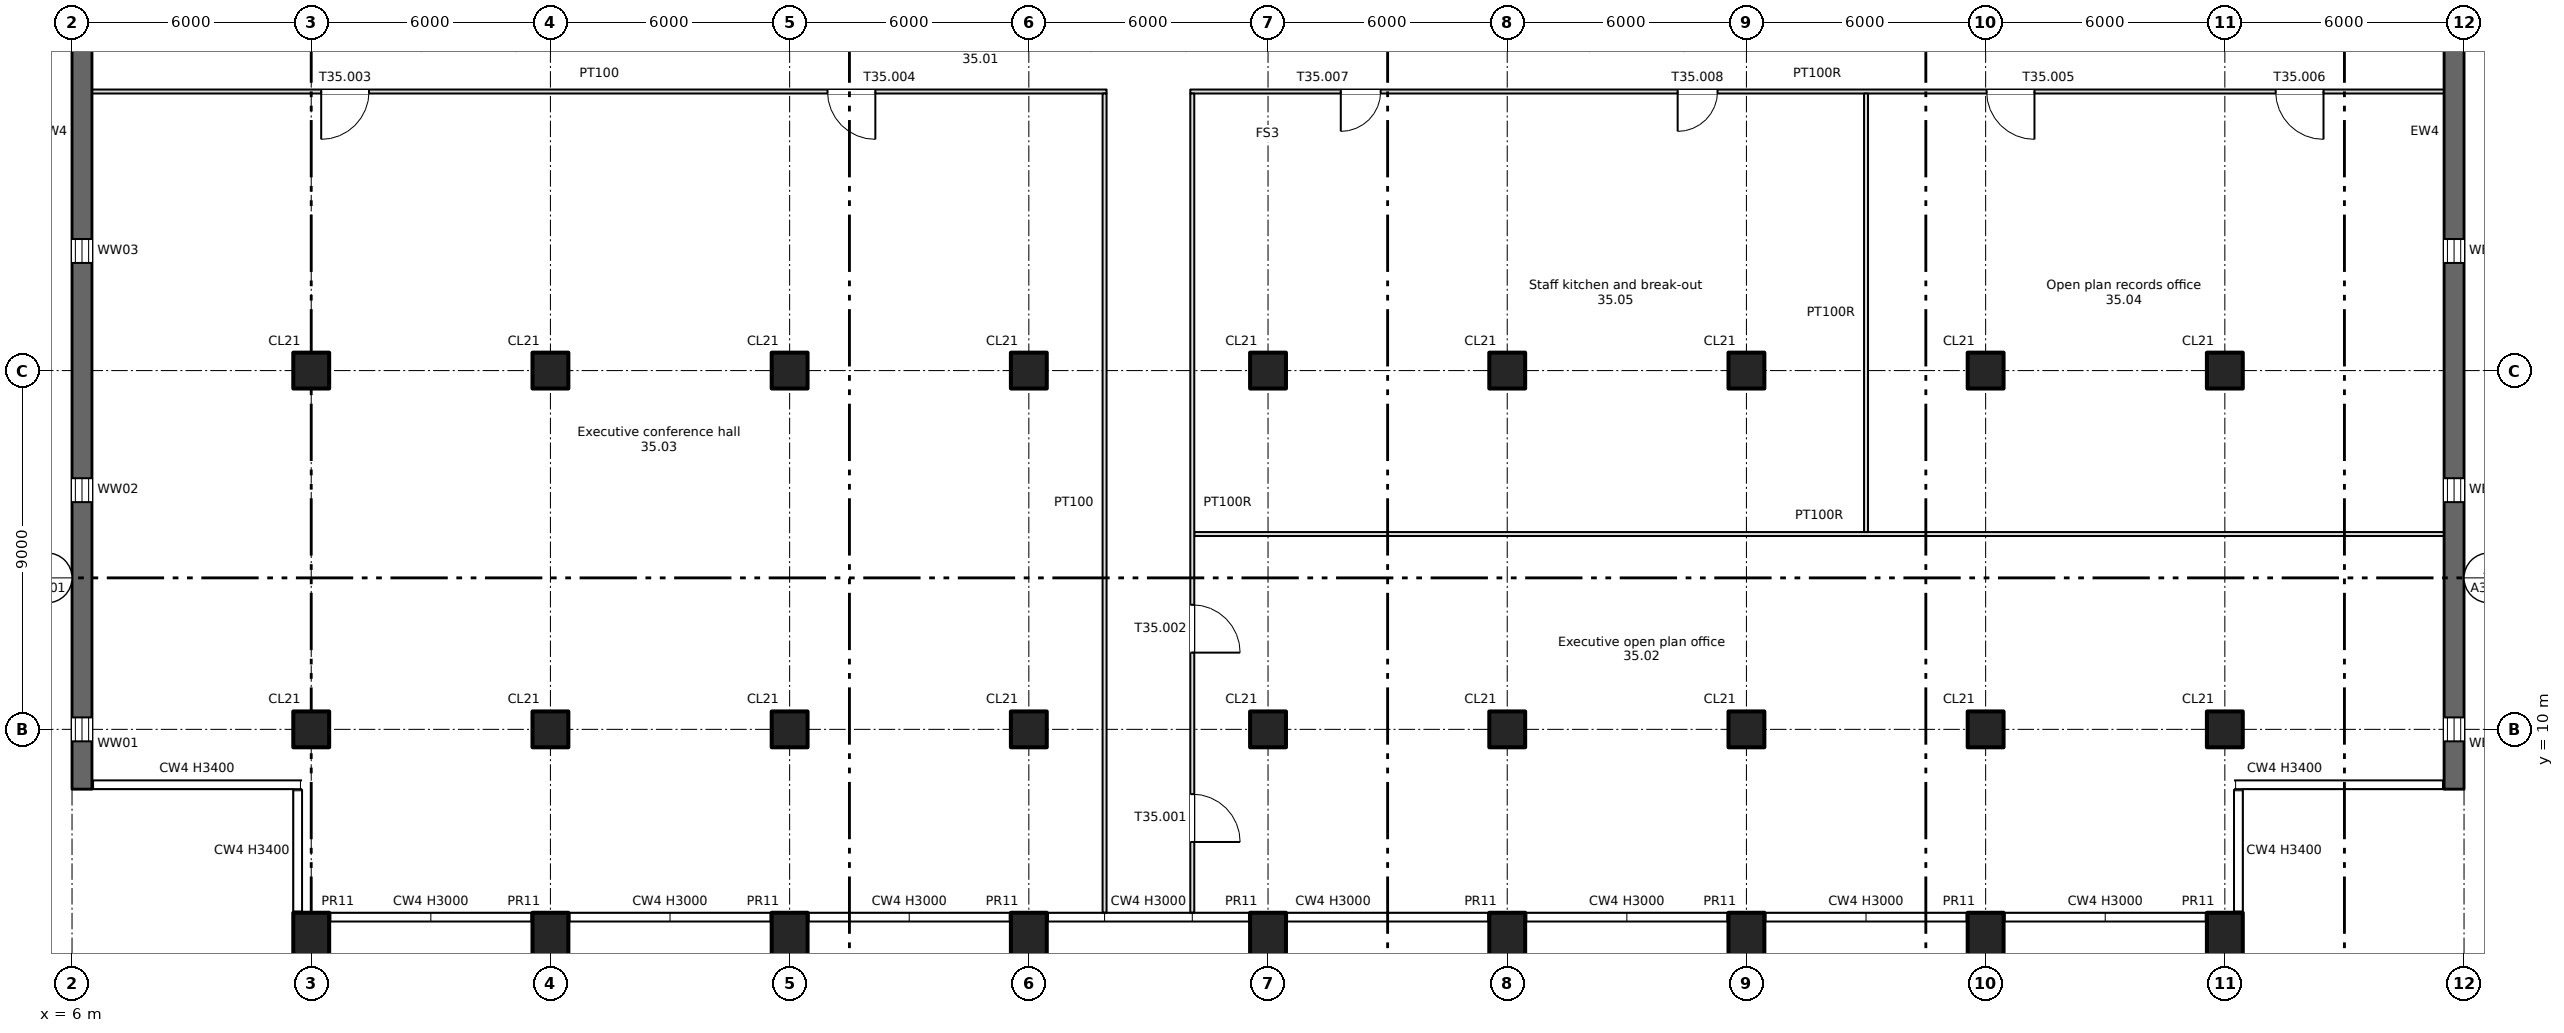
"""IFC4 building model, lengths in metres.
Left out: names, types, materials, properties, quantities, classifications, styles, units other than length and angle.
Written with IfcOpenShell. Run it as: python <this file> out.ifc"""

import sys

from ifc_helpers import new_model, si_unit, direction, frame, frame_2d, origin, origin_2d, place, context, subcontext, project, spatial, rectangle, extrude, element, fill, save


model = new_model("IFC4")
c1 = context("Model", 3, precision=1e-05, world=origin(), true_north=direction((0.0, 1.0)))
c2 = subcontext(c1, "Body", "Model", "MODEL_VIEW")
j1 = project(units=[si_unit("LENGTHUNIT", "METRE"), si_unit("PLANEANGLEUNIT", "RADIAN")], contexts=[c1])
p1 = place(None, origin())
s1 = spatial("IfcSite", under=j1, at=p1, CompositionType="ELEMENT")
p2 = place(p1, origin())
s2 = spatial("IfcBuilding", under=s1, at=p2, CompositionType="ELEMENT")
p3 = place(p2, frame((0.0, 0.0, 243.15)))
s3 = spatial("IfcBuildingStorey", under=s2, at=p3, CompositionType="ELEMENT", Elevation=243.15)
for number, where, z_axis, x_axis in (
    (1, (12.0, 4.7, -0.4), (0.0, 0.0, 1.0), (1.0, 0.0, 0.0)),
    (2, (18.0, 4.7, -0.4), (0.0, 0.0, 1.0), (1.0, 0.0, 0.0)),
    (3, (24.0, 4.7, -0.4), (0.0, 0.0, 1.0), (1.0, 0.0, 0.0)),
    (4, (30.0, 4.7, -0.4), (0.0, 0.0, 1.0), (1.0, 0.0, 0.0)),
    (5, (36.0, 4.7, -0.4), (0.0, 0.0, 1.0), (1.0, 0.0, 0.0)),
    (6, (42.0, 4.7, -0.4), (0.0, 0.0, 1.0), (1.0, 0.0, 0.0)),
    (7, (48.0, 4.7, -0.4), (0.0, 0.0, 1.0), (1.0, 0.0, 0.0)),
    (8, (54.0, 4.7, -0.4), (0.0, 0.0, 1.0), (1.0, 0.0, 0.0)),
    (9, (60.0, 4.7, -0.4), (0.0, 0.0, 1.0), (1.0, 0.0, 0.0)),
):
    element("IfcColumn", number, at=place(p3, frame(where, z_axis=z_axis, x_axis=x_axis)), inside=s3, PredefinedType="COLUMN", context=c2, shape_type="SweptSolid", body=[
        extrude(rectangle(XDim=0.9, YDim=1.4, at=origin_2d()), origin(), (0.0, 0.0, 1.0), 3.8),
    ])
for number, where, z_axis, x_axis in (
    (10, (12.0, 10.0, 0.0), (0.0, 0.0, 1.0), (1.0, 0.0, 0.0)),
    (11, (12.0, 19.0, 0.0), (0.0, 0.0, 1.0), (1.0, 0.0, 0.0)),
    (12, (18.0, 10.0, 0.0), (0.0, 0.0, 1.0), (1.0, 0.0, 0.0)),
    (13, (18.0, 19.0, 0.0), (0.0, 0.0, 1.0), (1.0, 0.0, 0.0)),
    (14, (24.0, 10.0, 0.0), (0.0, 0.0, 1.0), (1.0, 0.0, 0.0)),
    (15, (24.0, 19.0, 0.0), (0.0, 0.0, 1.0), (1.0, 0.0, 0.0)),
    (16, (30.0, 10.0, 0.0), (0.0, 0.0, 1.0), (1.0, 0.0, 0.0)),
    (17, (30.0, 19.0, 0.0), (0.0, 0.0, 1.0), (1.0, 0.0, 0.0)),
    (18, (36.0, 10.0, 0.0), (0.0, 0.0, 1.0), (1.0, 0.0, 0.0)),
    (19, (36.0, 19.0, 0.0), (0.0, 0.0, 1.0), (1.0, 0.0, 0.0)),
    (20, (42.0, 10.0, 0.0), (0.0, 0.0, 1.0), (1.0, 0.0, 0.0)),
    (21, (42.0, 19.0, 0.0), (0.0, 0.0, 1.0), (1.0, 0.0, 0.0)),
    (22, (48.0, 10.0, 0.0), (0.0, 0.0, 1.0), (1.0, 0.0, 0.0)),
    (23, (48.0, 19.0, 0.0), (0.0, 0.0, 1.0), (1.0, 0.0, 0.0)),
    (24, (54.0, 10.0, 0.0), (0.0, 0.0, 1.0), (1.0, 0.0, 0.0)),
    (25, (54.0, 19.0, 0.0), (0.0, 0.0, 1.0), (1.0, 0.0, 0.0)),
    (26, (60.0, 10.0, 0.0), (0.0, 0.0, 1.0), (1.0, 0.0, 0.0)),
    (27, (60.0, 19.0, 0.0), (0.0, 0.0, 1.0), (1.0, 0.0, 0.0)),
):
    element("IfcColumn", number, at=place(p3, frame(where, z_axis=z_axis, x_axis=x_axis)), inside=s3, PredefinedType="COLUMN", context=c2, shape_type="SweptSolid", body=[
        extrude(rectangle(XDim=0.9, YDim=0.9, at=origin_2d()), origin(), (0.0, 0.0, 1.0), 3.4),
    ])
p4 = place(p3, frame((6.25, 8.5, 0.0), z_axis=(0.0, 0.0, 1.0), x_axis=(0.0, 1.0, 0.0)))
e28 = element("IfcWall", 28, at=p4, inside=s3, PredefinedType="SHEAR", context=c2, shape_type="SweptSolid", body=[
    extrude(rectangle(XDim=33.0, YDim=0.5, at=frame_2d((16.5, 0.0))), origin(), (0.0, 0.0, 1.0), 3.4),
])
p5 = place(p4, frame((1.2, 0.0, 0.6)))
e29 = element("IfcOpeningElement", 29, at=p5, cuts=e28, PredefinedType="OPENING", context=c2, shape_type="SweptSolid", body=[
    extrude(rectangle(XDim=0.6, YDim=2.4, at=frame_2d((0.3, 1.2))), frame((0.0, 0.26, 0.0), z_axis=(0.0, -1.0, 0.0), x_axis=(1.0, 0.0, 0.0)), (0.0, 0.0, 1.0), 0.52),
])
p6 = place(p4, frame((7.2, 0.0, 0.6)))
e30 = element("IfcOpeningElement", 30, at=p6, cuts=e28, PredefinedType="OPENING", context=c2, shape_type="SweptSolid", body=[
    extrude(rectangle(XDim=0.6, YDim=2.4, at=frame_2d((0.3, 1.2))), frame((0.0, 0.26, 0.0), z_axis=(0.0, -1.0, 0.0), x_axis=(1.0, 0.0, 0.0)), (0.0, 0.0, 1.0), 0.52),
])
p7 = place(p4, frame((13.2, 0.0, 0.6)))
e31 = element("IfcOpeningElement", 31, at=p7, cuts=e28, PredefinedType="OPENING", context=c2, shape_type="SweptSolid", body=[
    extrude(rectangle(XDim=0.6, YDim=2.4, at=frame_2d((0.3, 1.2))), frame((0.0, 0.26, 0.0), z_axis=(0.0, -1.0, 0.0), x_axis=(1.0, 0.0, 0.0)), (0.0, 0.0, 1.0), 0.52),
])
p8 = place(p3, frame((65.75, 8.5, 0.0), z_axis=(0.0, 0.0, 1.0), x_axis=(0.0, 1.0, 0.0)))
e32 = element("IfcWall", 32, at=p8, inside=s3, PredefinedType="SHEAR", context=c2, shape_type="SweptSolid", body=[
    extrude(rectangle(XDim=33.0, YDim=0.5, at=frame_2d((16.5, 0.0))), origin(), (0.0, 0.0, 1.0), 3.4),
])
p9 = place(p8, frame((1.2, 0.0, 0.6)))
e33 = element("IfcOpeningElement", 33, at=p9, cuts=e32, PredefinedType="OPENING", context=c2, shape_type="SweptSolid", body=[
    extrude(rectangle(XDim=0.6, YDim=2.4, at=frame_2d((0.3, 1.2))), frame((0.0, 0.26, 0.0), z_axis=(0.0, -1.0, 0.0), x_axis=(1.0, 0.0, 0.0)), (0.0, 0.0, 1.0), 0.52),
])
p10 = place(p8, frame((7.2, 0.0, 0.6)))
e34 = element("IfcOpeningElement", 34, at=p10, cuts=e32, PredefinedType="OPENING", context=c2, shape_type="SweptSolid", body=[
    extrude(rectangle(XDim=0.6, YDim=2.4, at=frame_2d((0.3, 1.2))), frame((0.0, 0.26, 0.0), z_axis=(0.0, -1.0, 0.0), x_axis=(1.0, 0.0, 0.0)), (0.0, 0.0, 1.0), 0.52),
])
p11 = place(p8, frame((13.2, 0.0, 0.6)))
e35 = element("IfcOpeningElement", 35, at=p11, cuts=e32, PredefinedType="OPENING", context=c2, shape_type="SweptSolid", body=[
    extrude(rectangle(XDim=0.6, YDim=2.4, at=frame_2d((0.3, 1.2))), frame((0.0, 0.26, 0.0), z_axis=(0.0, -1.0, 0.0), x_axis=(1.0, 0.0, 0.0)), (0.0, 0.0, 1.0), 0.52),
])
p12 = place(p3, frame((34.15, 14.9, 0.0), z_axis=(0.0, 0.0, 1.0), x_axis=(1.0, 0.0, 0.0)))
e36 = element("IfcWall", 36, at=p12, inside=s3, PredefinedType="PARTITIONING", context=c2, shape_type="SweptSolid", body=[
    extrude(rectangle(XDim=31.35, YDim=0.1, at=frame_2d((15.675, 0.0))), origin(), (0.0, 0.0, 1.0), 3.4),
])
p13 = place(p3, frame((6.5, 26.0, 0.0), z_axis=(0.0, 0.0, 1.0), x_axis=(1.0, 0.0, 0.0)))
e37 = element("IfcWall", 37, at=p13, inside=s3, PredefinedType="PARTITIONING", context=c2, shape_type="SweptSolid", body=[
    extrude(rectangle(XDim=25.45, YDim=0.1, at=frame_2d((12.725, 0.0))), origin(), (0.0, 0.0, 1.0), 3.4),
])
p14 = place(p13, frame((5.75, 0.0, 0.0)))
e38 = element("IfcOpeningElement", 38, at=p14, cuts=e37, PredefinedType="OPENING", context=c2, shape_type="SweptSolid", body=[
    extrude(rectangle(XDim=1.2, YDim=2.1, at=frame_2d((0.6, 1.05))), frame((0.0, 0.06, 0.0), z_axis=(0.0, -1.0, 0.0), x_axis=(1.0, 0.0, 0.0)), (0.0, 0.0, 1.0), 0.12),
])
p15 = place(p13, frame((18.45, 0.0, 0.0)))
e39 = element("IfcOpeningElement", 39, at=p15, cuts=e37, PredefinedType="OPENING", context=c2, shape_type="SweptSolid", body=[
    extrude(rectangle(XDim=1.2, YDim=2.1, at=frame_2d((0.6, 1.05))), frame((0.0, 0.06, 0.0), z_axis=(0.0, -1.0, 0.0), x_axis=(1.0, 0.0, 0.0)), (0.0, 0.0, 1.0), 0.12),
])
p16 = place(p3, frame((34.05, 26.0, 0.0), z_axis=(0.0, 0.0, 1.0), x_axis=(1.0, 0.0, 0.0)))
e40 = element("IfcWall", 40, at=p16, inside=s3, PredefinedType="PARTITIONING", context=c2, shape_type="SweptSolid", body=[
    extrude(rectangle(XDim=31.45, YDim=0.1, at=frame_2d((15.725, 0.0))), origin(), (0.0, 0.0, 1.0), 3.4),
])
p17 = place(p16, frame((19.975, 0.0, 0.0)))
e41 = element("IfcOpeningElement", 41, at=p17, cuts=e40, PredefinedType="OPENING", context=c2, shape_type="SweptSolid", body=[
    extrude(rectangle(XDim=1.2, YDim=2.1, at=frame_2d((0.6, 1.05))), frame((0.0, 0.06, 0.0), z_axis=(0.0, -1.0, 0.0), x_axis=(1.0, 0.0, 0.0)), (0.0, 0.0, 1.0), 0.12),
])
p18 = place(p16, frame((27.225, 0.0, 0.0)))
e42 = element("IfcOpeningElement", 42, at=p18, cuts=e40, PredefinedType="OPENING", context=c2, shape_type="SweptSolid", body=[
    extrude(rectangle(XDim=1.2, YDim=2.1, at=frame_2d((0.6, 1.05))), frame((0.0, 0.06, 0.0), z_axis=(0.0, -1.0, 0.0), x_axis=(1.0, 0.0, 0.0)), (0.0, 0.0, 1.0), 0.12),
])
p19 = place(p16, frame((3.775, 0.0, 0.0)))
e43 = element("IfcOpeningElement", 43, at=p19, cuts=e40, PredefinedType="OPENING", context=c2, shape_type="SweptSolid", body=[
    extrude(rectangle(XDim=1.0, YDim=2.1, at=frame_2d((0.5, 1.05))), frame((0.0, 0.06, 0.0), z_axis=(0.0, -1.0, 0.0), x_axis=(1.0, 0.0, 0.0)), (0.0, 0.0, 1.0), 0.12),
])
p20 = place(p16, frame((12.225, 0.0, 0.0)))
e44 = element("IfcOpeningElement", 44, at=p20, cuts=e40, PredefinedType="OPENING", context=c2, shape_type="SweptSolid", body=[
    extrude(rectangle(XDim=1.0, YDim=2.1, at=frame_2d((0.5, 1.05))), frame((0.0, 0.06, 0.0), z_axis=(0.0, -1.0, 0.0), x_axis=(1.0, 0.0, 0.0)), (0.0, 0.0, 1.0), 0.12),
])
p21 = place(p3, frame((31.9, 5.4, 0.0), z_axis=(0.0, 0.0, 1.0), x_axis=(0.0, 1.0, 0.0)))
e45 = element("IfcWall", 45, at=p21, inside=s3, PredefinedType="PARTITIONING", context=c2, shape_type="SweptSolid", body=[
    extrude(rectangle(XDim=20.55, YDim=0.1, at=frame_2d((10.275, 0.0))), origin(), (0.0, 0.0, 1.0), 3.4),
])
p22 = place(p3, frame((34.1, 5.4, 0.0), z_axis=(0.0, 0.0, 1.0), x_axis=(0.0, 1.0, 0.0)))
e46 = element("IfcWall", 46, at=p22, inside=s3, PredefinedType="PARTITIONING", context=c2, shape_type="SweptSolid", body=[
    extrude(rectangle(XDim=20.55, YDim=0.1, at=frame_2d((10.275, 0.0))), origin(), (0.0, 0.0, 1.0), 3.4),
])
p23 = place(p22, frame((1.775, 0.0, 0.0)))
e47 = element("IfcOpeningElement", 47, at=p23, cuts=e46, PredefinedType="OPENING", context=c2, shape_type="SweptSolid", body=[
    extrude(rectangle(XDim=1.2, YDim=2.1, at=frame_2d((0.6, 1.05))), frame((0.0, 0.06, 0.0), z_axis=(0.0, -1.0, 0.0), x_axis=(1.0, 0.0, 0.0)), (0.0, 0.0, 1.0), 0.12),
])
p24 = place(p22, frame((6.525, 0.0, 0.0)))
e48 = element("IfcOpeningElement", 48, at=p24, cuts=e46, PredefinedType="OPENING", context=c2, shape_type="SweptSolid", body=[
    extrude(rectangle(XDim=1.2, YDim=2.1, at=frame_2d((0.6, 1.05))), frame((0.0, 0.06, 0.0), z_axis=(0.0, -1.0, 0.0), x_axis=(1.0, 0.0, 0.0)), (0.0, 0.0, 1.0), 0.12),
])
p25 = place(p3, frame((51.0, 14.95, 0.0), z_axis=(0.0, 0.0, 1.0), x_axis=(0.0, 1.0, 0.0)))
e49 = element("IfcWall", 49, at=p25, inside=s3, PredefinedType="PARTITIONING", context=c2, shape_type="SweptSolid", body=[
    extrude(rectangle(XDim=11.0, YDim=0.1, at=frame_2d((5.5, 0.0))), origin(), (0.0, 0.0, 1.0), 3.4),
])
p26 = place(p5, origin())
e50 = element("IfcWindow", 50, at=p26, inside=s3, PartitioningType="SINGLE_PANEL", PredefinedType="WINDOW", context=c2, shape_type="SweptSolid", body=[
    extrude(rectangle(XDim=0.6, YDim=2.4, at=frame_2d((0.3, 1.2))), frame((0.0, 0.03, 0.0), z_axis=(0.0, -1.0, 0.0), x_axis=(1.0, 0.0, 0.0)), (0.0, 0.0, 1.0), 0.06),
])
fill(e29, e50)
p27 = place(p6, origin())
e51 = element("IfcWindow", 51, at=p27, inside=s3, PartitioningType="SINGLE_PANEL", PredefinedType="WINDOW", context=c2, shape_type="SweptSolid", body=[
    extrude(rectangle(XDim=0.6, YDim=2.4, at=frame_2d((0.3, 1.2))), frame((0.0, 0.03, 0.0), z_axis=(0.0, -1.0, 0.0), x_axis=(1.0, 0.0, 0.0)), (0.0, 0.0, 1.0), 0.06),
])
fill(e30, e51)
p28 = place(p7, origin())
e52 = element("IfcWindow", 52, at=p28, inside=s3, PartitioningType="SINGLE_PANEL", PredefinedType="WINDOW", context=c2, shape_type="SweptSolid", body=[
    extrude(rectangle(XDim=0.6, YDim=2.4, at=frame_2d((0.3, 1.2))), frame((0.0, 0.03, 0.0), z_axis=(0.0, -1.0, 0.0), x_axis=(1.0, 0.0, 0.0)), (0.0, 0.0, 1.0), 0.06),
])
fill(e31, e52)
p29 = place(p9, origin())
e53 = element("IfcWindow", 53, at=p29, inside=s3, PartitioningType="SINGLE_PANEL", PredefinedType="WINDOW", context=c2, shape_type="SweptSolid", body=[
    extrude(rectangle(XDim=0.6, YDim=2.4, at=frame_2d((0.3, 1.2))), frame((0.0, 0.03, 0.0), z_axis=(0.0, -1.0, 0.0), x_axis=(1.0, 0.0, 0.0)), (0.0, 0.0, 1.0), 0.06),
])
fill(e33, e53)
p30 = place(p10, origin())
e54 = element("IfcWindow", 54, at=p30, inside=s3, PartitioningType="SINGLE_PANEL", PredefinedType="WINDOW", context=c2, shape_type="SweptSolid", body=[
    extrude(rectangle(XDim=0.6, YDim=2.4, at=frame_2d((0.3, 1.2))), frame((0.0, 0.03, 0.0), z_axis=(0.0, -1.0, 0.0), x_axis=(1.0, 0.0, 0.0)), (0.0, 0.0, 1.0), 0.06),
])
fill(e34, e54)
p31 = place(p11, origin())
e55 = element("IfcWindow", 55, at=p31, inside=s3, PartitioningType="SINGLE_PANEL", PredefinedType="WINDOW", context=c2, shape_type="SweptSolid", body=[
    extrude(rectangle(XDim=0.6, YDim=2.4, at=frame_2d((0.3, 1.2))), frame((0.0, 0.03, 0.0), z_axis=(0.0, -1.0, 0.0), x_axis=(1.0, 0.0, 0.0)), (0.0, 0.0, 1.0), 0.06),
])
fill(e35, e55)
p32 = place(p23, origin())
e56 = element("IfcDoor", 56, at=p32, inside=s3, OperationType="SINGLE_SWING_LEFT", PredefinedType="DOOR", context=c2, shape_type="SweptSolid", body=[
    extrude(rectangle(XDim=1.2, YDim=2.1, at=frame_2d((0.6, 1.05))), frame((0.0, 0.025, 0.0), z_axis=(0.0, -1.0, 0.0), x_axis=(1.0, 0.0, 0.0)), (0.0, 0.0, 1.0), 0.05),
])
fill(e47, e56)
p33 = place(p24, origin())
e57 = element("IfcDoor", 57, at=p33, inside=s3, OperationType="SINGLE_SWING_LEFT", PredefinedType="DOOR", context=c2, shape_type="SweptSolid", body=[
    extrude(rectangle(XDim=1.2, YDim=2.1, at=frame_2d((0.6, 1.05))), frame((0.0, 0.025, 0.0), z_axis=(0.0, -1.0, 0.0), x_axis=(1.0, 0.0, 0.0)), (0.0, 0.0, 1.0), 0.05),
])
fill(e48, e57)
p34 = place(p14, origin())
e58 = element("IfcDoor", 58, at=p34, inside=s3, OperationType="SINGLE_SWING_LEFT", PredefinedType="DOOR", context=c2, shape_type="SweptSolid", body=[
    extrude(rectangle(XDim=1.2, YDim=2.1, at=frame_2d((0.6, 1.05))), frame((0.0, 0.025, 0.0), z_axis=(0.0, -1.0, 0.0), x_axis=(1.0, 0.0, 0.0)), (0.0, 0.0, 1.0), 0.05),
])
fill(e38, e58)
p35 = place(p15, origin())
e59 = element("IfcDoor", 59, at=p35, inside=s3, OperationType="SINGLE_SWING_RIGHT", PredefinedType="DOOR", context=c2, shape_type="SweptSolid", body=[
    extrude(rectangle(XDim=1.2, YDim=2.1, at=frame_2d((0.6, 1.05))), frame((0.0, 0.025, 0.0), z_axis=(0.0, -1.0, 0.0), x_axis=(1.0, 0.0, 0.0)), (0.0, 0.0, 1.0), 0.05),
])
fill(e39, e59)
p36 = place(p17, origin())
e60 = element("IfcDoor", 60, at=p36, inside=s3, OperationType="SINGLE_SWING_RIGHT", PredefinedType="DOOR", context=c2, shape_type="SweptSolid", body=[
    extrude(rectangle(XDim=1.2, YDim=2.1, at=frame_2d((0.6, 1.05))), frame((0.0, 0.025, 0.0), z_axis=(0.0, -1.0, 0.0), x_axis=(1.0, 0.0, 0.0)), (0.0, 0.0, 1.0), 0.05),
])
fill(e41, e60)
p37 = place(p18, origin())
e61 = element("IfcDoor", 61, at=p37, inside=s3, OperationType="SINGLE_SWING_RIGHT", PredefinedType="DOOR", context=c2, shape_type="SweptSolid", body=[
    extrude(rectangle(XDim=1.2, YDim=2.1, at=frame_2d((0.6, 1.05))), frame((0.0, 0.025, 0.0), z_axis=(0.0, -1.0, 0.0), x_axis=(1.0, 0.0, 0.0)), (0.0, 0.0, 1.0), 0.05),
])
fill(e42, e61)
p38 = place(p19, origin())
e62 = element("IfcDoor", 62, at=p38, inside=s3, OperationType="SINGLE_SWING_LEFT", PredefinedType="DOOR", context=c2, shape_type="SweptSolid", body=[
    extrude(rectangle(XDim=1.0, YDim=2.1, at=frame_2d((0.5, 1.05))), frame((0.0, 0.025, 0.0), z_axis=(0.0, -1.0, 0.0), x_axis=(1.0, 0.0, 0.0)), (0.0, 0.0, 1.0), 0.05),
])
fill(e43, e62)
p39 = place(p20, origin())
e63 = element("IfcDoor", 63, at=p39, inside=s3, OperationType="SINGLE_SWING_LEFT", PredefinedType="DOOR", context=c2, shape_type="SweptSolid", body=[
    extrude(rectangle(XDim=1.0, YDim=2.1, at=frame_2d((0.5, 1.05))), frame((0.0, 0.025, 0.0), z_axis=(0.0, -1.0, 0.0), x_axis=(1.0, 0.0, 0.0)), (0.0, 0.0, 1.0), 0.05),
])
fill(e44, e63)
save(model, sys.argv[1])
